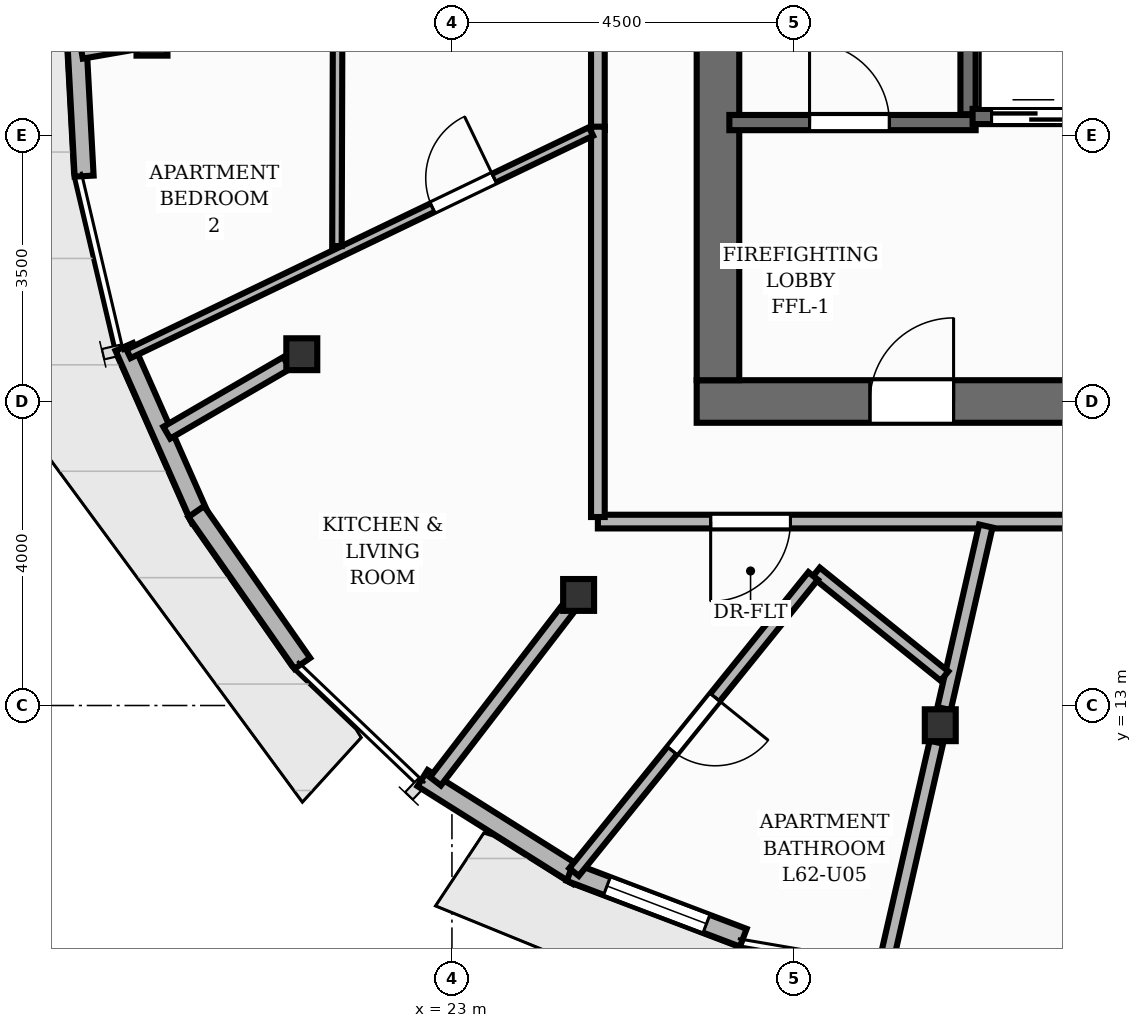
"""IFC4 building model, lengths in metres.
Left out: names, types, materials, properties, quantities, classifications, styles, units other than length and angle.
Written with IfcOpenShell. Run it as: python <this file> out.ifc"""

import sys

from ifc_helpers import new_model, si_unit, direction, frame, frame_2d, origin, origin_2d, place, context, subcontext, project, spatial, rectangle, i_section, extrude, element, fill, save


model = new_model("IFC4")
c1 = context("Model", 3, precision=1e-05, world=origin(), true_north=direction((0.0, 1.0)))
c2 = subcontext(c1, "Body", "Model", "MODEL_VIEW")
j1 = project(units=[si_unit("LENGTHUNIT", "METRE"), si_unit("PLANEANGLEUNIT", "RADIAN")], contexts=[c1])
p1 = place(None, origin())
s1 = spatial("IfcSite", under=j1, at=p1, CompositionType="ELEMENT")
p2 = place(p1, origin())
s2 = spatial("IfcBuilding", under=s1, at=p2, CompositionType="ELEMENT")
p3 = place(p2, frame((0.0, 0.0, 207.84)))
s3 = spatial("IfcBuildingStorey", under=s2, at=p3, CompositionType="ELEMENT", Elevation=207.84)
p4 = place(p3, frame((26.22, 17.0, 0.0), z_axis=(0.0, 0.0, 1.0), x_axis=(1.0, 0.0, 0.0)))
e1 = element("IfcWall", 1, at=p4, inside=s3, PredefinedType="SHEAR", context=c2, shape_type="SweptSolid", body=[
    extrude(rectangle(XDim=11.56, YDim=0.56, at=frame_2d((5.78, 0.0))), origin(), (0.0, 0.0, 1.0), 3.2),
])
p5 = place(p4, frame((2.28, 0.0, 0.0)))
e2 = element("IfcOpeningElement", 2, at=p5, cuts=e1, PredefinedType="OPENING", context=c2, shape_type="SweptSolid", body=[
    extrude(rectangle(XDim=1.1, YDim=2.15, at=frame_2d((0.55, 1.075))), frame((0.0, 0.29, 0.0), z_axis=(0.0, -1.0, 0.0), x_axis=(1.0, 0.0, 0.0)), (0.0, 0.0, 1.0), 0.58),
])
p6 = place(p4, frame((5.83, 0.0, 0.0)))
e3 = element("IfcOpeningElement", 3, at=p6, cuts=e1, PredefinedType="OPENING", context=c2, shape_type="SweptSolid", body=[
    extrude(rectangle(XDim=0.9, YDim=2.1, at=frame_2d((0.45, 1.05))), frame((0.0, 0.29, 0.0), z_axis=(0.0, -1.0, 0.0), x_axis=(1.0, 0.0, 0.0)), (0.0, 0.0, 1.0), 0.58),
])
p7 = place(p3, frame((26.5, 17.28, 0.0), z_axis=(0.0, 0.0, 1.0), x_axis=(0.0, 1.0, 0.0)))
e4 = element("IfcWall", 4, at=p7, inside=s3, PredefinedType="SHEAR", context=c2, shape_type="SweptSolid", body=[
    extrude(rectangle(XDim=13.44, YDim=0.56, at=frame_2d((6.72, 0.0))), origin(), (0.0, 0.0, 1.0), 3.2),
])
for number, where, z_axis, x_axis in (
    (5, (19.054, 21.76, 0.0), (0.0, 0.0, 1.0), (1.0, 0.0, 0.0)),
    (6, (21.025, 17.622, 0.0), (0.0, 0.0, 1.0), (1.0, 0.0, 0.0)),
    (7, (24.667, 14.455, 0.0), (0.0, 0.0, 1.0), (1.0, 0.0, 0.0)),
    (8, (29.425, 12.74, 0.0), (0.0, 0.0, 1.0), (1.0, 0.0, 0.0)),
):
    element("IfcColumn", number, at=place(p3, frame(where, z_axis=z_axis, x_axis=x_axis)), inside=s3, PredefinedType="COLUMN", context=c2, shape_type="SweptSolid", body=[
        extrude(i_section(OverallWidth=0.407, OverallDepth=0.419, WebThickness=0.031, FlangeThickness=0.049, at=origin_2d()), origin(), (0.0, 0.0, 1.0), 3.2),
    ])
p8 = place(p3, frame((18.161, 19.966, 0.0), z_axis=(0.0, 0.0, 1.0), x_axis=(-0.053868666674, 0.998548029266, 0.0)))
e9 = element("IfcWall", 9, at=p8, inside=s3, PredefinedType="SOLIDWALL", context=c2, shape_type="SweptSolid", body=[
    extrude(rectangle(XDim=2.592, YDim=0.25, at=frame_2d((1.296, 0.0))), origin(), (0.0, 0.0, 1.0), 2.96),
])
p9 = place(p3, frame((19.691, 15.452, 0.0), z_axis=(0.0, 0.0, 1.0), x_axis=(-0.404748462651, 0.91442806277, 0.0)))
e10 = element("IfcWall", 10, at=p9, inside=s3, PredefinedType="SOLIDWALL", context=c2, shape_type="SweptSolid", body=[
    extrude(rectangle(XDim=2.478, YDim=0.25, at=frame_2d((1.239, 0.0))), origin(), (0.0, 0.0, 1.0), 2.96),
])
p10 = place(p3, frame((21.031, 13.554, 0.0), z_axis=(0.0, 0.0, 1.0), x_axis=(-0.572877205554, 0.819641206478, 0.0)))
e11 = element("IfcWall", 11, at=p10, inside=s3, PredefinedType="SOLIDWALL", context=c2, shape_type="SweptSolid", body=[
    extrude(rectangle(XDim=2.437, YDim=0.25, at=frame_2d((1.218, 0.0))), origin(), (0.0, 0.0, 1.0), 2.96),
])
p11 = place(p3, frame((24.657, 10.758, 0.0), z_axis=(0.0, 0.0, 1.0), x_axis=(-0.846426943671, 0.532504862914, 0.0)))
e12 = element("IfcWall", 12, at=p11, inside=s3, PredefinedType="SOLIDWALL", context=c2, shape_type="SweptSolid", body=[
    extrude(rectangle(XDim=2.415, YDim=0.25, at=frame_2d((1.208, 0.0))), origin(), (0.0, 0.0, 1.0), 2.96),
])
p12 = place(p3, frame((26.833, 9.945, 0.0), z_axis=(0.0, 0.0, 1.0), x_axis=(-0.934909280934, 0.354886793813, 0.0)))
e13 = element("IfcWall", 13, at=p12, inside=s3, PredefinedType="SOLIDWALL", context=c2, shape_type="SweptSolid", body=[
    extrude(rectangle(XDim=2.437, YDim=0.25, at=frame_2d((1.218, 0.0))), origin(), (0.0, 0.0, 1.0), 2.96),
])
p13 = place(p12, frame((0.518, 0.0, 0.85)))
e14 = element("IfcOpeningElement", 14, at=p13, cuts=e13, PredefinedType="OPENING", context=c2, shape_type="SweptSolid", body=[
    extrude(rectangle(XDim=1.4, YDim=1.55, at=frame_2d((0.7, 0.775))), frame((0.0, 0.135, 0.0), z_axis=(0.0, -1.0, 0.0), x_axis=(1.0, 0.0, 0.0)), (0.0, 0.0, 1.0), 0.27),
])
p14 = place(p3, frame((29.79, 20.78, 0.0), z_axis=(0.0, 0.0, 1.0), x_axis=(0.0, 1.0, 0.0)))
e15 = element("IfcWall", 15, at=p14, inside=s3, PredefinedType="SHEAR", context=c2, shape_type="SweptSolid", body=[
    extrude(rectangle(XDim=6.44, YDim=0.2, at=frame_2d((3.22, 0.0))), origin(), (0.0, 0.0, 1.0), 3.2),
])
p15 = place(p3, frame((26.65, 20.67, 0.0), z_axis=(0.0, 0.0, 1.0), x_axis=(1.0, 0.0, 0.0)))
e16 = element("IfcWall", 16, at=p15, inside=s3, PredefinedType="SHEAR", context=c2, shape_type="SweptSolid", body=[
    extrude(rectangle(XDim=3.24, YDim=0.2, at=frame_2d((1.62, 0.0))), origin(), (0.0, 0.0, 1.0), 3.2),
])
p16 = place(p15, frame((1.055, 0.0, 0.0)))
e17 = element("IfcOpeningElement", 17, at=p16, cuts=e16, PredefinedType="OPENING", context=c2, shape_type="SweptSolid", body=[
    extrude(rectangle(XDim=1.05, YDim=2.15, at=frame_2d((0.525, 1.075))), frame((0.0, 0.11, 0.0), z_axis=(0.0, -1.0, 0.0), x_axis=(1.0, 0.0, 0.0)), (0.0, 0.0, 1.0), 0.22),
])
p17 = place(p3, frame((29.85, 20.75, 0.0), z_axis=(0.0, 0.0, 1.0), x_axis=(1.0, 0.0, 0.0)))
e18 = element("IfcWall", 18, at=p17, inside=s3, PredefinedType="SHEAR", context=c2, shape_type="SweptSolid", body=[
    extrude(rectangle(XDim=2.3, YDim=0.2, at=frame_2d((1.15, 0.0))), origin(), (0.0, 0.0, 1.0), 3.2),
])
p18 = place(p17, frame((0.25, 0.0, 0.0)))
e19 = element("IfcOpeningElement", 19, at=p18, cuts=e18, PredefinedType="OPENING", context=c2, shape_type="SweptSolid", body=[
    extrude(rectangle(XDim=1.1, YDim=2.15, at=frame_2d((0.55, 1.075))), frame((0.0, 0.11, 0.0), z_axis=(0.0, -1.0, 0.0), x_axis=(1.0, 0.0, 0.0)), (0.0, 0.0, 1.0), 0.22),
])
p19 = place(p3, frame((18.827, 21.721, 0.0), z_axis=(0.0, 0.0, 1.0), x_axis=(-0.985352727868, -0.170528594914, 0.0)))
e20 = element("IfcWall", 20, at=p19, inside=s3, PredefinedType="PARTITIONING", context=c2, shape_type="SweptSolid", body=[
    extrude(rectangle(XDim=0.71, YDim=0.18, at=frame_2d((0.355, 0.0))), origin(), (0.0, 0.0, 1.0), 2.403),
])
p20 = place(p3, frame((20.826, 17.507, 0.0), z_axis=(0.0, 0.0, 1.0), x_axis=(-0.864597744878, -0.502464664979, 0.0)))
e21 = element("IfcWall", 21, at=p20, inside=s3, PredefinedType="PARTITIONING", context=c2, shape_type="SweptSolid", body=[
    extrude(rectangle(XDim=1.825, YDim=0.18, at=frame_2d((0.913, 0.0))), origin(), (0.0, 0.0, 1.0), 2.403),
])
p21 = place(p3, frame((24.527, 14.273, 0.0), z_axis=(0.0, 0.0, 1.0), x_axis=(-0.609211911664, -0.793007469502, 0.0)))
e22 = element("IfcWall", 22, at=p21, inside=s3, PredefinedType="PARTITIONING", context=c2, shape_type="SweptSolid", body=[
    extrude(rectangle(XDim=2.863, YDim=0.18, at=frame_2d((1.431, 0.0))), origin(), (0.0, 0.0, 1.0), 2.403),
])
p22 = place(p3, frame((29.374, 12.517, 0.0), z_axis=(0.0, 0.0, 1.0), x_axis=(-0.22289331625, -0.974842843525, 0.0)))
e23 = element("IfcWall", 23, at=p22, inside=s3, PredefinedType="PARTITIONING", context=c2, shape_type="SweptSolid", body=[
    extrude(rectangle(XDim=2.903, YDim=0.18, at=frame_2d((1.451, 0.0))), origin(), (0.0, 0.0, 1.0), 2.403),
])
p23 = place(p3, frame((39.08, 15.42, 0.0), z_axis=(0.0, 0.0, 1.0), x_axis=(-1.0, 0.0, 0.0)))
e24 = element("IfcWall", 24, at=p23, inside=s3, PredefinedType="PARTITIONING", context=c2, shape_type="SweptSolid", body=[
    extrude(rectangle(XDim=14.16, YDim=0.18, at=frame_2d((7.08, 0.0))), origin(), (0.0, 0.0, 1.0), 2.955),
])
p24 = place(p23, frame((5.658, 0.0, 0.0)))
e25 = element("IfcOpeningElement", 25, at=p24, cuts=e24, PredefinedType="OPENING", context=c2, shape_type="SweptSolid", body=[
    extrude(rectangle(XDim=1.05, YDim=2.15, at=frame_2d((0.525, 1.075))), frame((0.0, 0.1, 0.0), z_axis=(0.0, -1.0, 0.0), x_axis=(1.0, 0.0, 0.0)), (0.0, 0.0, 1.0), 0.2),
])
p25 = place(p23, frame((11.626, 0.0, 0.0)))
e26 = element("IfcOpeningElement", 26, at=p25, cuts=e24, PredefinedType="OPENING", context=c2, shape_type="SweptSolid", body=[
    extrude(rectangle(XDim=1.05, YDim=2.15, at=frame_2d((0.525, 1.075))), frame((0.0, 0.1, 0.0), z_axis=(0.0, -1.0, 0.0), x_axis=(1.0, 0.0, 0.0)), (0.0, 0.0, 1.0), 0.2),
])
p26 = place(p3, frame((24.92, 20.574, 0.0), z_axis=(0.0, 0.0, 1.0), x_axis=(0.0, 1.0, 0.0)))
e27 = element("IfcWall", 27, at=p26, inside=s3, PredefinedType="PARTITIONING", context=c2, shape_type="SweptSolid", body=[
    extrude(rectangle(XDim=12.006, YDim=0.18, at=frame_2d((6.003, 0.0))), origin(), (0.0, 0.0, 1.0), 2.955),
])
p27 = place(p3, frame((24.92, 15.48, 0.0), z_axis=(0.0, 0.0, 1.0), x_axis=(0.0, 1.0, 0.0)))
e28 = element("IfcWall", 28, at=p27, inside=s3, PredefinedType="PARTITIONING", context=c2, shape_type="SweptSolid", body=[
    extrude(rectangle(XDim=5.136, YDim=0.18, at=frame_2d((2.568, 0.0))), origin(), (0.0, 0.0, 1.0), 2.955),
])
p28 = place(p3, frame((29.475, 12.959, 0.0), z_axis=(0.0, 0.0, 1.0), x_axis=(0.222927030412, 0.974835134323, 0.0)))
e29 = element("IfcWall", 29, at=p28, inside=s3, PredefinedType="PARTITIONING", context=c2, shape_type="SweptSolid", body=[
    extrude(rectangle(XDim=2.464, YDim=0.18, at=frame_2d((1.232, 0.0))), origin(), (0.0, 0.0, 1.0), 2.403),
])
p29 = place(p3, frame((29.48, 13.387, 0.0), z_axis=(0.0, 0.0, 1.0), x_axis=(-0.778120709533, 0.628114767695, 0.0)))
e30 = element("IfcWall", 30, at=p29, inside=s3, PredefinedType="PLUMBINGWALL", context=c2, shape_type="SweptSolid", body=[
    extrude(rectangle(XDim=2.173, YDim=0.16, at=frame_2d((1.086, 0.0))), origin(), (0.0, 0.0, 1.0), 2.955),
])
p30 = place(p3, frame((27.752, 14.705, 0.0), z_axis=(0.0, 0.0, 1.0), x_axis=(-0.628089704981, -0.778140939996, 0.0)))
e31 = element("IfcWall", 31, at=p30, inside=s3, PredefinedType="PLUMBINGWALL", context=c2, shape_type="SweptSolid", body=[
    extrude(rectangle(XDim=5.008, YDim=0.16, at=frame_2d((2.504, 0.0))), origin(), (0.0, 0.0, 1.0), 2.955),
])
p31 = place(p30, frame((2.054, 0.0, 0.0)))
e32 = element("IfcOpeningElement", 32, at=p31, cuts=e31, PredefinedType="OPENING", context=c2, shape_type="SweptSolid", body=[
    extrude(rectangle(XDim=0.9, YDim=2.1, at=frame_2d((0.45, 1.05))), frame((0.0, 0.09, 0.0), z_axis=(0.0, -1.0, 0.0), x_axis=(1.0, 0.0, 0.0)), (0.0, 0.0, 1.0), 0.18),
])
p32 = place(p3, frame((18.745, 17.627, 0.0), z_axis=(0.0, 0.0, 1.0), x_axis=(0.901255411719, 0.433288221451, 0.0)))
e33 = element("IfcWall", 33, at=p32, inside=s3, PredefinedType="PARTITIONING", context=c2, shape_type="SweptSolid", body=[
    extrude(rectangle(XDim=6.751, YDim=0.125, at=frame_2d((3.376, 0.0))), origin(), (0.0, 0.0, 1.0), 2.955),
])
p33 = place(p32, frame((4.437, 0.0, 0.0)))
e34 = element("IfcOpeningElement", 34, at=p33, cuts=e33, PredefinedType="OPENING", context=c2, shape_type="SweptSolid", body=[
    extrude(rectangle(XDim=0.9, YDim=2.1, at=frame_2d((0.45, 1.05))), frame((0.0, 0.073, 0.0), z_axis=(0.0, -1.0, 0.0), x_axis=(1.0, 0.0, 0.0)), (0.0, 0.0, 1.0), 0.145),
])
p34 = place(p3, frame((21.487, 19.045, 0.0), z_axis=(0.0, 0.0, 1.0), x_axis=(0.003056179539, 0.999995329872, 0.0)))
e35 = element("IfcWall", 35, at=p34, inside=s3, PredefinedType="PARTITIONING", context=c2, shape_type="SweptSolid", body=[
    extrude(rectangle(XDim=10.944, YDim=0.125, at=frame_2d((5.472, 0.0))), origin(), (0.0, 0.0, 1.0), 2.955),
])
p35 = place(p34, frame((5.022, 0.0, 0.0)))
e36 = element("IfcOpeningElement", 36, at=p35, cuts=e35, PredefinedType="OPENING", context=c2, shape_type="SweptSolid", body=[
    extrude(rectangle(XDim=0.9, YDim=2.1, at=frame_2d((0.45, 1.05))), frame((0.0, 0.073, 0.0), z_axis=(0.0, -1.0, 0.0), x_axis=(1.0, 0.0, 0.0)), (0.0, 0.0, 1.0), 0.145),
])
p36 = place(p13, origin())
e37 = element("IfcWindow", 37, at=p36, inside=s3, PartitioningType="SINGLE_PANEL", PredefinedType="WINDOW", context=c2, shape_type="SweptSolid", body=[
    extrude(rectangle(XDim=1.4, YDim=1.55, at=frame_2d((0.7, 0.775))), frame((0.0, 0.03, 0.0), z_axis=(0.0, -1.0, 0.0), x_axis=(1.0, 0.0, 0.0)), (0.0, 0.0, 1.0), 0.06),
])
fill(e14, e37)
p37 = place(p16, origin())
e38 = element("IfcDoor", 38, at=p37, inside=s3, OperationType="SINGLE_SWING_LEFT", PredefinedType="DOOR", context=c2, shape_type="SweptSolid", body=[
    extrude(rectangle(XDim=1.05, YDim=2.15, at=frame_2d((0.525, 1.075))), frame((0.0, 0.025, 0.0), z_axis=(0.0, -1.0, 0.0), x_axis=(1.0, 0.0, 0.0)), (0.0, 0.0, 1.0), 0.05),
])
fill(e17, e38)
p38 = place(p5, origin())
e39 = element("IfcDoor", 39, at=p38, inside=s3, OperationType="SINGLE_SWING_RIGHT", PredefinedType="DOOR", context=c2, shape_type="SweptSolid", body=[
    extrude(rectangle(XDim=1.1, YDim=2.15, at=frame_2d((0.55, 1.075))), frame((0.0, 0.025, 0.0), z_axis=(0.0, -1.0, 0.0), x_axis=(1.0, 0.0, 0.0)), (0.0, 0.0, 1.0), 0.05),
])
fill(e2, e39)
p39 = place(p18, origin())
e40 = element("IfcDoor", 40, at=p39, inside=s3, OperationType="DOUBLE_DOOR_SLIDING", PredefinedType="DOOR", context=c2, shape_type="SweptSolid", body=[
    extrude(rectangle(XDim=1.1, YDim=2.15, at=frame_2d((0.55, 1.075))), frame((0.0, 0.025, 0.0), z_axis=(0.0, -1.0, 0.0), x_axis=(1.0, 0.0, 0.0)), (0.0, 0.0, 1.0), 0.05),
])
fill(e19, e40)
p40 = place(p25, origin())
e41 = element("IfcDoor", 41, at=p40, inside=s3, OperationType="SINGLE_SWING_RIGHT", PredefinedType="DOOR", context=c2, shape_type="SweptSolid", body=[
    extrude(rectangle(XDim=1.05, YDim=2.15, at=frame_2d((0.525, 1.075))), frame((0.0, 0.025, 0.0), z_axis=(0.0, -1.0, 0.0), x_axis=(1.0, 0.0, 0.0)), (0.0, 0.0, 1.0), 0.05),
])
fill(e26, e41)
p41 = place(p31, origin())
e42 = element("IfcDoor", 42, at=p41, inside=s3, OperationType="SINGLE_SWING_LEFT", PredefinedType="DOOR", context=c2, shape_type="SweptSolid", body=[
    extrude(rectangle(XDim=0.9, YDim=2.1, at=frame_2d((0.45, 1.05))), frame((0.0, 0.025, 0.0), z_axis=(0.0, -1.0, 0.0), x_axis=(1.0, 0.0, 0.0)), (0.0, 0.0, 1.0), 0.05),
])
fill(e32, e42)
p42 = place(p33, origin())
e43 = element("IfcDoor", 43, at=p42, inside=s3, OperationType="SINGLE_SWING_RIGHT", PredefinedType="DOOR", context=c2, shape_type="SweptSolid", body=[
    extrude(rectangle(XDim=0.9, YDim=2.1, at=frame_2d((0.45, 1.05))), frame((0.0, 0.025, 0.0), z_axis=(0.0, -1.0, 0.0), x_axis=(1.0, 0.0, 0.0)), (0.0, 0.0, 1.0), 0.05),
])
fill(e34, e43)
save(model, sys.argv[1])
